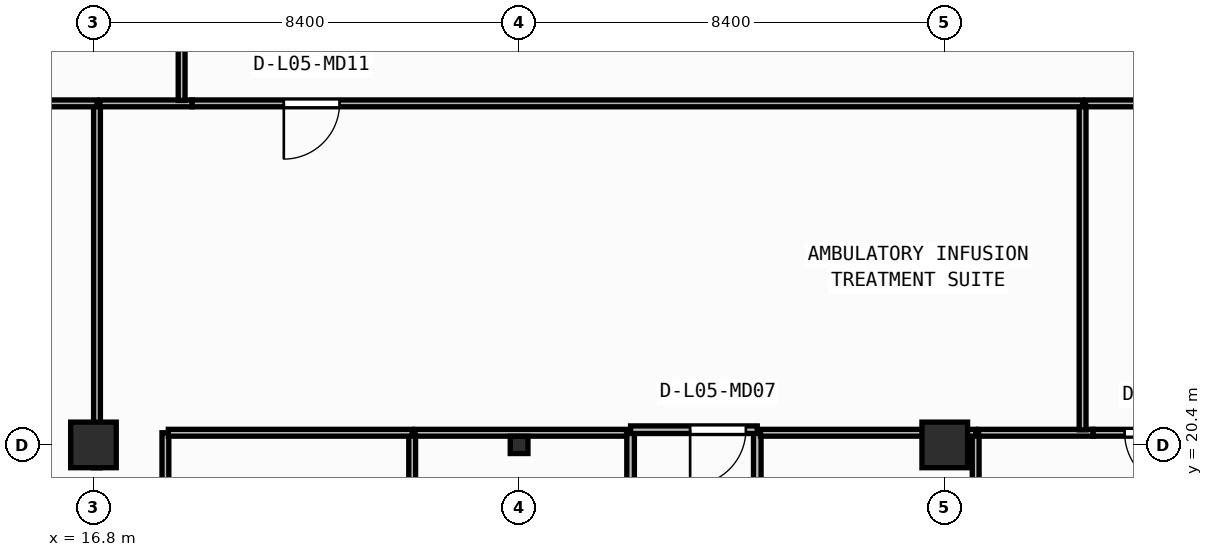
"""IFC4 building model, lengths in metres.
Left out: names, types, materials, properties, quantities, classifications, styles, units other than length and angle.
Written with IfcOpenShell. Run it as: python <this file> out.ifc"""

import sys

from ifc_helpers import new_model, si_unit, direction, frame, frame_2d, origin, origin_2d, place, context, subcontext, project, spatial, rectangle, i_section, extrude, element, fill, save


model = new_model("IFC4")
c1 = context("Model", 3, precision=1e-05, world=origin(), true_north=direction((0.0, 1.0)))
c2 = subcontext(c1, "Body", "Model", "MODEL_VIEW")
j1 = project(units=[si_unit("LENGTHUNIT", "METRE"), si_unit("PLANEANGLEUNIT", "RADIAN")], contexts=[c1])
p1 = place(None, origin())
s1 = spatial("IfcSite", under=j1, at=p1, CompositionType="ELEMENT")
p2 = place(p1, origin())
s2 = spatial("IfcBuilding", under=s1, at=p2, CompositionType="ELEMENT")
p3 = place(p2, frame((0.0, 0.0, 22.5)))
s3 = spatial("IfcBuildingStorey", under=s2, at=p3, CompositionType="ELEMENT", Elevation=22.5)
p4 = place(p3, frame((16.8, 20.4, 0.0), z_axis=(0.0, 0.0, 1.0), x_axis=(1.0, 0.0, 0.0)))
e1 = element("IfcColumn", 1, at=p4, inside=s3, PredefinedType="COLUMN", context=c2, shape_type="SweptSolid", body=[
    extrude(rectangle(XDim=0.9, YDim=0.9, at=origin_2d()), origin(), (0.0, 0.0, 1.0), 3.95),
])
p5 = place(p3, frame((25.2, 20.4, 0.0), z_axis=(0.0, 0.0, 1.0), x_axis=(1.0, 0.0, 0.0)))
e2 = element("IfcColumn", 2, at=p5, inside=s3, PredefinedType="COLUMN", context=c2, shape_type="SweptSolid", body=[
    extrude(i_section(OverallWidth=0.35, OverallDepth=0.34, WebThickness=0.016, FlangeThickness=0.028, at=origin_2d()), origin(), (0.0, 0.0, 1.0), 3.95),
])
p6 = place(p3, frame((33.6, 20.4, 0.0), z_axis=(0.0, 0.0, 1.0), x_axis=(1.0, 0.0, 0.0)))
e3 = element("IfcColumn", 3, at=p6, inside=s3, PredefinedType="COLUMN", context=c2, shape_type="SweptSolid", body=[
    extrude(rectangle(XDim=0.9, YDim=0.9, at=origin_2d()), origin(), (0.0, 0.0, 1.0), 3.95),
])
for number, where, z_axis, x_axis in (
    (4, (27.4, 20.7, 0.0), (0.0, 0.0, 1.0), (0.0, -1.0, 0.0)),
    (5, (29.9, 14.7, 0.0), (0.0, 0.0, 1.0), (0.0, 1.0, 0.0)),
):
    element("IfcWall", number, at=place(p3, frame(where, z_axis=z_axis, x_axis=x_axis)), inside=s3, PredefinedType="PARTITIONING", context=c2, shape_type="SweptSolid", body=[
        extrude(rectangle(XDim=6.0, YDim=0.15, at=frame_2d((3.0, 0.0))), origin(), (0.0, 0.0, 1.0), 3.71),
    ])
p7 = place(p3, frame((29.9, 20.7, 0.0), z_axis=(0.0, 0.0, 1.0), x_axis=(-1.0, 0.0, 0.0)))
e6 = element("IfcWall", 6, at=p7, inside=s3, PredefinedType="PARTITIONING", context=c2, shape_type="SweptSolid", body=[
    extrude(rectangle(XDim=2.5, YDim=0.15, at=frame_2d((1.25, 0.0))), origin(), (0.0, 0.0, 1.0), 3.073),
])
p8 = place(p7, frame((0.225, 0.0, 0.0)))
e7 = element("IfcOpeningElement", 7, at=p8, cuts=e6, PredefinedType="OPENING", context=c2, shape_type="SweptSolid", body=[
    extrude(rectangle(XDim=1.1, YDim=2.1, at=frame_2d((0.55, 1.05))), frame((0.0, 0.085, 0.0), z_axis=(0.0, -1.0, 0.0), x_axis=(1.0, 0.0, 0.0)), (0.0, 0.0, 1.0), 0.17),
])
p9 = place(p3, frame((18.22, 17.833, 0.0), z_axis=(0.0, 0.0, 1.0), x_axis=(0.0, 1.0, 0.0)))
e8 = element("IfcWall", 8, at=p9, inside=s3, PredefinedType="PARTITIONING", context=c2, shape_type="SweptSolid", body=[
    extrude(rectangle(XDim=2.807, YDim=0.135, at=frame_2d((1.404, 0.0))), origin(), (0.0, 0.0, 1.0), 3.71),
])
p10 = place(p3, frame((23.09, 14.76, 0.0), z_axis=(0.0, 0.0, 1.0), x_axis=(0.0, 1.0, 0.0)))
e9 = element("IfcWall", 9, at=p10, inside=s3, PredefinedType="PARTITIONING", context=c2, shape_type="SweptSolid", body=[
    extrude(rectangle(XDim=5.88, YDim=0.135, at=frame_2d((2.94, 0.0))), origin(), (0.0, 0.0, 1.0), 3.71),
])
p11 = place(p3, frame((23.09, 20.64, 0.0), z_axis=(0.0, 0.0, 1.0), x_axis=(-1.0, 0.0, 0.0)))
e10 = element("IfcWall", 10, at=p11, inside=s3, PredefinedType="PARTITIONING", context=c2, shape_type="SweptSolid", body=[
    extrude(rectangle(XDim=4.812, YDim=0.135, at=frame_2d((2.406, 0.0))), origin(), (0.0, 0.0, 1.0), 3.073),
])
p12 = place(p3, frame((27.32, 20.64, 0.0), z_axis=(0.0, 0.0, 1.0), x_axis=(-1.0, 0.0, 0.0)))
e11 = element("IfcWall", 11, at=p12, inside=s3, PredefinedType="PARTITIONING", context=c2, shape_type="SweptSolid", body=[
    extrude(rectangle(XDim=4.173, YDim=0.135, at=frame_2d((2.086, 0.0))), origin(), (0.0, 0.0, 1.0), 3.073),
])
p13 = place(p3, frame((34.21, 17.833, 0.0), z_axis=(0.0, 0.0, 1.0), x_axis=(0.0, 1.0, 0.0)))
e12 = element("IfcWall", 12, at=p13, inside=s3, PredefinedType="PARTITIONING", context=c2, shape_type="SweptSolid", body=[
    extrude(rectangle(XDim=2.807, YDim=0.135, at=frame_2d((1.404, 0.0))), origin(), (0.0, 0.0, 1.0), 3.71),
])
p14 = place(p3, frame((34.21, 20.64, 0.0), z_axis=(0.0, 0.0, 1.0), x_axis=(-1.0, 0.0, 0.0)))
e13 = element("IfcWall", 13, at=p14, inside=s3, PredefinedType="PARTITIONING", context=c2, shape_type="SweptSolid", body=[
    extrude(rectangle(XDim=4.245, YDim=0.135, at=frame_2d((2.123, 0.0))), origin(), (0.0, 0.0, 1.0), 3.073),
])
p15 = place(p3, frame((36.528, 20.64, 0.0), z_axis=(0.0, 0.0, 1.0), x_axis=(-1.0, 0.0, 0.0)))
e14 = element("IfcWall", 14, at=p15, inside=s3, PredefinedType="PARTITIONING", context=c2, shape_type="SweptSolid", body=[
    extrude(rectangle(XDim=2.26, YDim=0.135, at=frame_2d((1.13, 0.0))), origin(), (0.0, 0.0, 1.0), 3.073),
])
p16 = place(p3, frame((38.87, 20.64, 0.0), z_axis=(0.0, 0.0, 1.0), x_axis=(-1.0, 0.0, 0.0)))
e15 = element("IfcWall", 15, at=p16, inside=s3, PredefinedType="PARTITIONING", context=c2, shape_type="SweptSolid", body=[
    extrude(rectangle(XDim=2.341, YDim=0.135, at=frame_2d((1.17, 0.0))), origin(), (0.0, 0.0, 1.0), 3.073),
])
p17 = place(p16, frame((0.62, 0.0, 0.0)))
e16 = element("IfcOpeningElement", 16, at=p17, cuts=e15, PredefinedType="OPENING", context=c2, shape_type="SweptSolid", body=[
    extrude(rectangle(XDim=1.1, YDim=2.1, at=frame_2d((0.55, 1.05))), frame((0.0, 0.077, 0.0), z_axis=(0.0, -1.0, 0.0), x_axis=(1.0, 0.0, 0.0)), (0.0, 0.0, 1.0), 0.155),
])
p18 = place(p3, frame((16.87, 19.95, 0.0), z_axis=(0.0, 0.0, 1.0), x_axis=(0.0, 1.0, 0.0)))
e17 = element("IfcWall", 17, at=p18, inside=s3, PredefinedType="PARTITIONING", context=c2, shape_type="SweptSolid", body=[
    extrude(rectangle(XDim=7.19, YDim=0.135, at=frame_2d((3.595, 0.0))), origin(), (0.0, 0.0, 1.0), 3.073),
])
p19 = place(p3, frame((16.87, 27.14, 0.0), z_axis=(0.0, 0.0, 1.0), x_axis=(-1.0, 0.0, 0.0)))
e18 = element("IfcWall", 18, at=p19, inside=s3, PredefinedType="PARTITIONING", context=c2, shape_type="SweptSolid", body=[
    extrude(rectangle(XDim=9.233, YDim=0.135, at=frame_2d((4.616, 0.0))), origin(), (0.0, 0.0, 1.0), 3.71),
])
p20 = place(p3, frame((36.32, 20.698, 0.0), z_axis=(0.0, 0.0, 1.0), x_axis=(0.0, 1.0, 0.0)))
e19 = element("IfcWall", 19, at=p20, inside=s3, PredefinedType="PARTITIONING", context=c2, shape_type="SweptSolid", body=[
    extrude(rectangle(XDim=6.442, YDim=0.135, at=frame_2d((3.221, 0.0))), origin(), (0.0, 0.0, 1.0), 3.71),
])
p21 = place(p3, frame((18.748, 27.14, 0.0), z_axis=(0.0, 0.0, 1.0), x_axis=(-1.0, 0.0, 0.0)))
e20 = element("IfcWall", 20, at=p21, inside=s3, PredefinedType="PARTITIONING", context=c2, shape_type="SweptSolid", body=[
    extrude(rectangle(XDim=1.82, YDim=0.135, at=frame_2d((0.91, 0.0))), origin(), (0.0, 0.0, 1.0), 3.71),
])
p22 = place(p3, frame((36.32, 27.14, 0.0), z_axis=(0.0, 0.0, 1.0), x_axis=(-1.0, 0.0, 0.0)))
e21 = element("IfcWall", 21, at=p22, inside=s3, PredefinedType="PARTITIONING", context=c2, shape_type="SweptSolid", body=[
    extrude(rectangle(XDim=17.571, YDim=0.135, at=frame_2d((8.785, 0.0))), origin(), (0.0, 0.0, 1.0), 3.71),
])
p23 = place(p22, frame((14.663, 0.0, 0.0)))
e22 = element("IfcOpeningElement", 22, at=p23, cuts=e21, PredefinedType="OPENING", context=c2, shape_type="SweptSolid", body=[
    extrude(rectangle(XDim=1.1, YDim=2.1, at=frame_2d((0.55, 1.05))), frame((0.0, 0.077, 0.0), z_axis=(0.0, -1.0, 0.0), x_axis=(1.0, 0.0, 0.0)), (0.0, 0.0, 1.0), 0.155),
])
p24 = place(p3, frame((43.917, 27.14, 0.0), z_axis=(0.0, 0.0, 1.0), x_axis=(-1.0, 0.0, 0.0)))
e23 = element("IfcWall", 23, at=p24, inside=s3, PredefinedType="PARTITIONING", context=c2, shape_type="SweptSolid", body=[
    extrude(rectangle(XDim=7.54, YDim=0.135, at=frame_2d((3.77, 0.0))), origin(), (0.0, 0.0, 1.0), 3.71),
])
p25 = place(p3, frame((18.54, 27.198, 0.0), z_axis=(0.0, 0.0, 1.0), x_axis=(0.0, 1.0, 0.0)))
e24 = element("IfcWall", 24, at=p25, inside=s3, PredefinedType="PARTITIONING", context=c2, shape_type="SweptSolid", body=[
    extrude(rectangle(XDim=7.046, YDim=0.135, at=frame_2d((3.523, 0.0))), origin(), (0.0, 0.0, 1.0), 3.71),
])
p26 = place(p8, origin())
e25 = element("IfcDoor", 25, at=p26, inside=s3, OperationType="SINGLE_SWING_RIGHT", PredefinedType="DOOR", context=c2, shape_type="SweptSolid", body=[
    extrude(rectangle(XDim=1.1, YDim=2.1, at=frame_2d((0.55, 1.05))), frame((0.0, 0.025, 0.0), z_axis=(0.0, -1.0, 0.0), x_axis=(1.0, 0.0, 0.0)), (0.0, 0.0, 1.0), 0.05),
])
fill(e7, e25)
p27 = place(p17, origin())
e26 = element("IfcDoor", 26, at=p27, inside=s3, OperationType="SINGLE_SWING_LEFT", PredefinedType="DOOR", context=c2, shape_type="SweptSolid", body=[
    extrude(rectangle(XDim=1.1, YDim=2.1, at=frame_2d((0.55, 1.05))), frame((0.0, 0.025, 0.0), z_axis=(0.0, -1.0, 0.0), x_axis=(1.0, 0.0, 0.0)), (0.0, 0.0, 1.0), 0.05),
])
fill(e16, e26)
p28 = place(p23, origin())
e27 = element("IfcDoor", 27, at=p28, inside=s3, OperationType="SINGLE_SWING_RIGHT", PredefinedType="DOOR", context=c2, shape_type="SweptSolid", body=[
    extrude(rectangle(XDim=1.1, YDim=2.1, at=frame_2d((0.55, 1.05))), frame((0.0, 0.025, 0.0), z_axis=(0.0, -1.0, 0.0), x_axis=(1.0, 0.0, 0.0)), (0.0, 0.0, 1.0), 0.05),
])
fill(e22, e27)
save(model, sys.argv[1])
